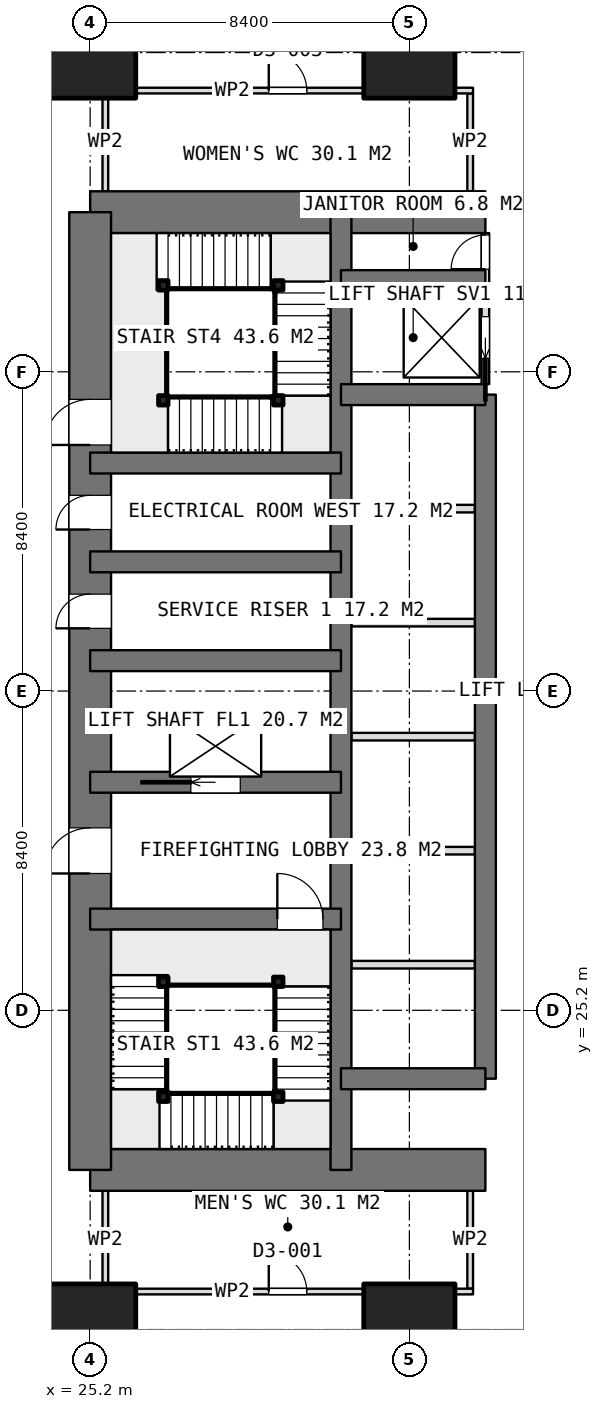
"""IFC4 building model, lengths in metres.
Left out: names, types, materials, properties, quantities, classifications, styles, units other than length and angle.
Written with IfcOpenShell. Run it as: python <this file> out.ifc"""

import sys

from ifc_helpers import new_model, si_unit, direction, frame, frame_2d, origin, origin_2d, place, context, subcontext, project, spatial, rectangle, extrude, element, fill, save


model = new_model("IFC4")
c1 = context("Model", 3, precision=1e-05, world=origin(), true_north=direction((0.0, 1.0)))
c2 = subcontext(c1, "Body", "Model", "MODEL_VIEW")
j1 = project(units=[si_unit("LENGTHUNIT", "METRE"), si_unit("PLANEANGLEUNIT", "RADIAN")], contexts=[c1])
p1 = place(None, origin())
s1 = spatial("IfcSite", under=j1, at=p1, CompositionType="ELEMENT")
p2 = place(p1, origin())
s2 = spatial("IfcBuilding", under=s1, at=p2, CompositionType="ELEMENT")
p3 = place(p2, frame((0.0, 0.0, -9.9)))
s3 = spatial("IfcBuildingStorey", under=s2, at=p3, CompositionType="ELEMENT", Elevation=-9.9)
for number, where, z_axis, x_axis in (
    (1, (25.2, 21.0, 0.0), (0.0, 0.0, 1.0), (1.0, 0.0, 0.0)),
    (2, (25.2, 46.2, 0.0), (0.0, 0.0, 1.0), (1.0, 0.0, 0.0)),
):
    element("IfcWall", number, at=place(p3, frame(where, z_axis=z_axis, x_axis=x_axis)), inside=s3, PredefinedType="SHEAR", context=c2, shape_type="SweptSolid", body=[
        extrude(rectangle(XDim=10.4, YDim=1.1, at=frame_2d((5.2, 0.0))), origin(), (0.0, 0.0, 1.0), 4.5),
    ])
p4 = place(p3, frame((25.2, 21.0, 0.0), z_axis=(0.0, 0.0, 1.0), x_axis=(0.0, 1.0, 0.0)))
e3 = element("IfcWall", 3, at=p4, inside=s3, PredefinedType="SHEAR", context=c2, shape_type="SweptSolid", body=[
    extrude(rectangle(XDim=25.2, YDim=1.1, at=frame_2d((12.6, 0.0))), origin(), (0.0, 0.0, 1.0), 4.5),
])
p5 = place(p4, frame((7.8, 0.0, 0.0)))
e4 = element("IfcOpeningElement", 4, at=p5, cuts=e3, PredefinedType="OPENING", context=c2, shape_type="SweptSolid", body=[
    extrude(rectangle(XDim=1.2, YDim=2.1, at=frame_2d((0.6, 1.05))), frame((0.0, 0.56, 0.0), z_axis=(0.0, -1.0, 0.0), x_axis=(1.0, 0.0, 0.0)), (0.0, 0.0, 1.0), 1.12),
])
p6 = place(p4, frame((14.25, 0.0, 0.0)))
e5 = element("IfcOpeningElement", 5, at=p6, cuts=e3, PredefinedType="OPENING", context=c2, shape_type="SweptSolid", body=[
    extrude(rectangle(XDim=0.9, YDim=2.1, at=frame_2d((0.45, 1.05))), frame((0.0, 0.56, 0.0), z_axis=(0.0, -1.0, 0.0), x_axis=(1.0, 0.0, 0.0)), (0.0, 0.0, 1.0), 1.12),
])
p7 = place(p4, frame((16.85, 0.0, 0.0)))
e6 = element("IfcOpeningElement", 6, at=p7, cuts=e3, PredefinedType="OPENING", context=c2, shape_type="SweptSolid", body=[
    extrude(rectangle(XDim=0.9, YDim=2.1, at=frame_2d((0.45, 1.05))), frame((0.0, 0.56, 0.0), z_axis=(0.0, -1.0, 0.0), x_axis=(1.0, 0.0, 0.0)), (0.0, 0.0, 1.0), 1.12),
])
p8 = place(p4, frame((19.075, 0.0, 0.0)))
e7 = element("IfcOpeningElement", 7, at=p8, cuts=e3, PredefinedType="OPENING", context=c2, shape_type="SweptSolid", body=[
    extrude(rectangle(XDim=1.2, YDim=2.1, at=frame_2d((0.6, 1.05))), frame((0.0, 0.56, 0.0), z_axis=(0.0, -1.0, 0.0), x_axis=(1.0, 0.0, 0.0)), (0.0, 0.0, 1.0), 1.12),
])
p9 = place(p3, frame((31.8, 21.0, 0.0), z_axis=(0.0, 0.0, 1.0), x_axis=(0.0, 1.0, 0.0)))
e8 = element("IfcWall", 8, at=p9, inside=s3, PredefinedType="SHEAR", context=c2, shape_type="SweptSolid", body=[
    extrude(rectangle(XDim=25.2, YDim=0.55, at=frame_2d((12.6, 0.0))), origin(), (0.0, 0.0, 1.0), 4.5),
])
p10 = place(p3, frame((35.6, 23.4, 0.0), z_axis=(0.0, 0.0, 1.0), x_axis=(0.0, 1.0, 0.0)))
e9 = element("IfcWall", 9, at=p10, inside=s3, PredefinedType="SHEAR", context=c2, shape_type="SweptSolid", body=[
    extrude(rectangle(XDim=18.0, YDim=0.55, at=frame_2d((9.0, 0.0))), origin(), (0.0, 0.0, 1.0), 4.5),
])
for number, where, z_axis, x_axis in (
    (10, (31.8, 23.4, 0.0), (0.0, 0.0, 1.0), (1.0, 0.0, 0.0)),
    (11, (31.8, 41.4, 0.0), (0.0, 0.0, 1.0), (1.0, 0.0, 0.0)),
    (12, (31.8, 44.4, 0.0), (0.0, 0.0, 1.0), (1.0, 0.0, 0.0)),
):
    element("IfcWall", number, at=place(p3, frame(where, z_axis=z_axis, x_axis=x_axis)), inside=s3, PredefinedType="SHEAR", context=c2, shape_type="SweptSolid", body=[
        extrude(rectangle(XDim=3.8, YDim=0.55, at=frame_2d((1.9, 0.0))), origin(), (0.0, 0.0, 1.0), 4.5),
    ])
p11 = place(p3, frame((25.2, 27.6, 0.0), z_axis=(0.0, 0.0, 1.0), x_axis=(1.0, 0.0, 0.0)))
e13 = element("IfcWall", 13, at=p11, inside=s3, PredefinedType="SHEAR", context=c2, shape_type="SweptSolid", body=[
    extrude(rectangle(XDim=6.6, YDim=0.55, at=frame_2d((3.3, 0.0))), origin(), (0.0, 0.0, 1.0), 4.5),
])
p12 = place(p11, frame((4.925, 0.0, 0.0)))
e14 = element("IfcOpeningElement", 14, at=p12, cuts=e13, PredefinedType="OPENING", context=c2, shape_type="SweptSolid", body=[
    extrude(rectangle(XDim=1.2, YDim=2.1, at=frame_2d((0.6, 1.05))), frame((0.0, 0.285, 0.0), z_axis=(0.0, -1.0, 0.0), x_axis=(1.0, 0.0, 0.0)), (0.0, 0.0, 1.0), 0.57),
])
p13 = place(p3, frame((25.2, 31.2, 0.0), z_axis=(0.0, 0.0, 1.0), x_axis=(1.0, 0.0, 0.0)))
e15 = element("IfcWall", 15, at=p13, inside=s3, PredefinedType="SHEAR", context=c2, shape_type="SweptSolid", body=[
    extrude(rectangle(XDim=6.6, YDim=0.55, at=frame_2d((3.3, 0.0))), origin(), (0.0, 0.0, 1.0), 4.5),
])
p14 = place(p13, frame((2.65, 0.0, 0.0)))
e16 = element("IfcOpeningElement", 16, at=p14, cuts=e15, PredefinedType="OPENING", context=c2, shape_type="SweptSolid", body=[
    extrude(rectangle(XDim=1.3, YDim=2.1, at=frame_2d((0.65, 1.05))), frame((0.0, 0.285, 0.0), z_axis=(0.0, -1.0, 0.0), x_axis=(1.0, 0.0, 0.0)), (0.0, 0.0, 1.0), 0.57),
])
for number, where, z_axis, x_axis in (
    (17, (25.2, 34.4, 0.0), (0.0, 0.0, 1.0), (1.0, 0.0, 0.0)),
    (18, (25.2, 37.0, 0.0), (0.0, 0.0, 1.0), (1.0, 0.0, 0.0)),
    (19, (25.2, 39.6, 0.0), (0.0, 0.0, 1.0), (1.0, 0.0, 0.0)),
):
    element("IfcWall", number, at=place(p3, frame(where, z_axis=z_axis, x_axis=x_axis)), inside=s3, PredefinedType="SHEAR", context=c2, shape_type="SweptSolid", body=[
        extrude(rectangle(XDim=6.6, YDim=0.55, at=frame_2d((3.3, 0.0))), origin(), (0.0, 0.0, 1.0), 4.5),
    ])
for number, where, z_axis, x_axis in (
    (20, (25.2, 16.8, 0.0), (0.0, 0.0, 1.0), (1.0, 0.0, 0.0)),
    (21, (25.2, 50.4, 0.0), (0.0, 0.0, 1.0), (1.0, 0.0, 0.0)),
    (22, (33.6, 16.8, 0.0), (0.0, 0.0, 1.0), (1.0, 0.0, 0.0)),
    (23, (33.6, 50.4, 0.0), (0.0, 0.0, 1.0), (1.0, 0.0, 0.0)),
):
    element("IfcColumn", number, at=place(p3, frame(where, z_axis=z_axis, x_axis=x_axis)), inside=s3, PredefinedType="COLUMN", context=c2, shape_type="SweptSolid", body=[
        extrude(rectangle(XDim=2.4, YDim=2.4, at=origin_2d()), origin(), (0.0, 0.0, 1.0), 4.5),
    ])
for number, where, z_axis, x_axis in (
    (24, (32.075, 26.4, 0.0), (0.0, 0.0, 1.0), (1.0, 0.0, 0.0)),
    (25, (32.075, 29.4, 0.0), (0.0, 0.0, 1.0), (1.0, 0.0, 0.0)),
    (26, (32.075, 32.4, 0.0), (0.0, 0.0, 1.0), (1.0, 0.0, 0.0)),
    (27, (32.075, 35.4, 0.0), (0.0, 0.0, 1.0), (1.0, 0.0, 0.0)),
    (28, (32.075, 38.4, 0.0), (0.0, 0.0, 1.0), (1.0, 0.0, 0.0)),
):
    element("IfcWall", number, at=place(p3, frame(where, z_axis=z_axis, x_axis=x_axis)), inside=s3, PredefinedType="PARTITIONING", context=c2, shape_type="SweptSolid", body=[
        extrude(rectangle(XDim=3.25, YDim=0.2, at=frame_2d((1.625, 0.0))), origin(), (0.0, 0.0, 1.0), 4.2),
    ])
p15 = place(p3, frame((35.6, 41.675, 0.0), z_axis=(0.0, 0.0, 1.0), x_axis=(0.0, 1.0, 0.0)))
e29 = element("IfcWall", 29, at=p15, inside=s3, PredefinedType="PARTITIONING", context=c2, shape_type="SweptSolid", body=[
    extrude(rectangle(XDim=3.975, YDim=0.2, at=frame_2d((1.987, 0.0))), origin(), (0.0, 0.0, 1.0), 4.2),
])
p16 = place(p15, frame((3.025, 0.0, 0.0)))
e30 = element("IfcOpeningElement", 30, at=p16, cuts=e29, PredefinedType="OPENING", context=c2, shape_type="SweptSolid", body=[
    extrude(rectangle(XDim=0.9, YDim=2.1, at=frame_2d((0.45, 1.05))), frame((0.0, 0.11, 0.0), z_axis=(0.0, -1.0, 0.0), x_axis=(1.0, 0.0, 0.0)), (0.0, 0.0, 1.0), 0.22),
])
p17 = place(p15, frame((0.675, 0.0, 0.0)))
e31 = element("IfcOpeningElement", 31, at=p17, cuts=e29, PredefinedType="OPENING", context=c2, shape_type="SweptSolid", body=[
    extrude(rectangle(XDim=1.1, YDim=2.1, at=frame_2d((0.55, 1.05))), frame((0.0, 0.11, 0.0), z_axis=(0.0, -1.0, 0.0), x_axis=(1.0, 0.0, 0.0)), (0.0, 0.0, 1.0), 0.22),
])
p18 = place(p3, frame((25.525, 49.4, 0.0), z_axis=(0.0, 0.0, 1.0), x_axis=(1.0, 0.0, 0.0)))
e32 = element("IfcWall", 32, at=p18, inside=s3, PredefinedType="PARTITIONING", context=c2, shape_type="SweptSolid", body=[
    extrude(rectangle(XDim=9.75, YDim=0.15, at=frame_2d((4.875, 0.0))), origin(), (0.0, 0.0, 1.0), 4.2),
])
p19 = place(p18, frame((4.375, 0.0, 0.0)))
e33 = element("IfcOpeningElement", 33, at=p19, cuts=e32, PredefinedType="OPENING", context=c2, shape_type="SweptSolid", body=[
    extrude(rectangle(XDim=1.0, YDim=2.1, at=frame_2d((0.5, 1.05))), frame((0.0, 0.085, 0.0), z_axis=(0.0, -1.0, 0.0), x_axis=(1.0, 0.0, 0.0)), (0.0, 0.0, 1.0), 0.17),
])
for number, where, z_axis, x_axis in (
    (34, (25.6, 46.75, 0.0), (0.0, 0.0, 1.0), (0.0, 1.0, 0.0)),
    (35, (35.2, 46.75, 0.0), (0.0, 0.0, 1.0), (0.0, 1.0, 0.0)),
):
    element("IfcWall", number, at=place(p3, frame(where, z_axis=z_axis, x_axis=x_axis)), inside=s3, PredefinedType="PARTITIONING", context=c2, shape_type="SweptSolid", body=[
        extrude(rectangle(XDim=2.575, YDim=0.15, at=frame_2d((1.288, 0.0))), origin(), (0.0, 0.0, 1.0), 4.2),
    ])
p20 = place(p3, frame((25.525, 17.8, 0.0), z_axis=(0.0, 0.0, 1.0), x_axis=(1.0, 0.0, 0.0)))
e36 = element("IfcWall", 36, at=p20, inside=s3, PredefinedType="PARTITIONING", context=c2, shape_type="SweptSolid", body=[
    extrude(rectangle(XDim=9.75, YDim=0.15, at=frame_2d((4.875, 0.0))), origin(), (0.0, 0.0, 1.0), 4.2),
])
p21 = place(p20, frame((4.375, 0.0, 0.0)))
e37 = element("IfcOpeningElement", 37, at=p21, cuts=e36, PredefinedType="OPENING", context=c2, shape_type="SweptSolid", body=[
    extrude(rectangle(XDim=1.0, YDim=2.1, at=frame_2d((0.5, 1.05))), frame((0.0, 0.085, 0.0), z_axis=(0.0, -1.0, 0.0), x_axis=(1.0, 0.0, 0.0)), (0.0, 0.0, 1.0), 0.17),
])
for number, where, z_axis, x_axis in (
    (38, (25.6, 17.875, 0.0), (0.0, 0.0, 1.0), (0.0, 1.0, 0.0)),
    (39, (35.2, 17.875, 0.0), (0.0, 0.0, 1.0), (0.0, 1.0, 0.0)),
):
    element("IfcWall", number, at=place(p3, frame(where, z_axis=z_axis, x_axis=x_axis)), inside=s3, PredefinedType="PARTITIONING", context=c2, shape_type="SweptSolid", body=[
        extrude(rectangle(XDim=2.575, YDim=0.15, at=frame_2d((1.288, 0.0))), origin(), (0.0, 0.0, 1.0), 4.2),
    ])
for number, where, z_axis, x_axis in (
    (40, (30.15, 25.95, 0.0), (0.0, 0.0, 1.0), (1.0, 0.0, 0.0)),
    (41, (30.15, 22.925, 0.0), (0.0, 0.0, 1.0), (1.0, 0.0, 0.0)),
    (42, (27.125, 22.925, 0.0), (0.0, 0.0, 1.0), (1.0, 0.0, 0.0)),
    (43, (27.125, 25.95, 0.0), (0.0, 0.0, 1.0), (1.0, 0.0, 0.0)),
    (44, (27.125, 41.25, 0.0), (0.0, 0.0, 1.0), (1.0, 0.0, 0.0)),
    (45, (30.15, 41.25, 0.0), (0.0, 0.0, 1.0), (1.0, 0.0, 0.0)),
    (46, (30.15, 44.275, 0.0), (0.0, 0.0, 1.0), (1.0, 0.0, 0.0)),
    (47, (27.125, 44.275, 0.0), (0.0, 0.0, 1.0), (1.0, 0.0, 0.0)),
):
    element("IfcColumn", number, at=place(p3, frame(where, z_axis=z_axis, x_axis=x_axis)), inside=s3, PredefinedType="COLUMN", context=c2, shape_type="SweptSolid", body=[
        extrude(rectangle(XDim=0.25, YDim=0.25, at=origin_2d()), origin(), (0.0, 0.0, 1.0), 4.5),
    ])
p22 = place(p5, origin())
e48 = element("IfcDoor", 48, at=p22, inside=s3, OperationType="SINGLE_SWING_LEFT", PredefinedType="DOOR", context=c2, shape_type="SweptSolid", body=[
    extrude(rectangle(XDim=1.2, YDim=2.1, at=frame_2d((0.6, 1.05))), frame((0.0, 0.025, 0.0), z_axis=(0.0, -1.0, 0.0), x_axis=(1.0, 0.0, 0.0)), (0.0, 0.0, 1.0), 0.05),
])
fill(e4, e48)
p23 = place(p6, origin())
e49 = element("IfcDoor", 49, at=p23, inside=s3, OperationType="SINGLE_SWING_LEFT", PredefinedType="DOOR", context=c2, shape_type="SweptSolid", body=[
    extrude(rectangle(XDim=0.9, YDim=2.1, at=frame_2d((0.45, 1.05))), frame((0.0, 0.025, 0.0), z_axis=(0.0, -1.0, 0.0), x_axis=(1.0, 0.0, 0.0)), (0.0, 0.0, 1.0), 0.05),
])
fill(e5, e49)
p24 = place(p7, origin())
e50 = element("IfcDoor", 50, at=p24, inside=s3, OperationType="SINGLE_SWING_LEFT", PredefinedType="DOOR", context=c2, shape_type="SweptSolid", body=[
    extrude(rectangle(XDim=0.9, YDim=2.1, at=frame_2d((0.45, 1.05))), frame((0.0, 0.025, 0.0), z_axis=(0.0, -1.0, 0.0), x_axis=(1.0, 0.0, 0.0)), (0.0, 0.0, 1.0), 0.05),
])
fill(e6, e50)
p25 = place(p16, origin())
e51 = element("IfcDoor", 51, at=p25, inside=s3, OperationType="SINGLE_SWING_LEFT", PredefinedType="DOOR", context=c2, shape_type="SweptSolid", body=[
    extrude(rectangle(XDim=0.9, YDim=2.1, at=frame_2d((0.45, 1.05))), frame((0.0, 0.025, 0.0), z_axis=(0.0, -1.0, 0.0), x_axis=(1.0, 0.0, 0.0)), (0.0, 0.0, 1.0), 0.05),
])
fill(e30, e51)
p26 = place(p14, origin())
e52 = element("IfcDoor", 52, at=p26, inside=s3, OperationType="SLIDING_TO_LEFT", PredefinedType="USERDEFINED", context=c2, shape_type="SweptSolid", body=[
    extrude(rectangle(XDim=1.3, YDim=2.1, at=frame_2d((0.65, 1.05))), frame((0.0, 0.025, 0.0), z_axis=(0.0, -1.0, 0.0), x_axis=(1.0, 0.0, 0.0)), (0.0, 0.0, 1.0), 0.05),
])
fill(e16, e52)
p27 = place(p17, origin())
e53 = element("IfcDoor", 53, at=p27, inside=s3, OperationType="SLIDING_TO_LEFT", PredefinedType="USERDEFINED", context=c2, shape_type="SweptSolid", body=[
    extrude(rectangle(XDim=1.1, YDim=2.1, at=frame_2d((0.55, 1.05))), frame((0.0, 0.025, 0.0), z_axis=(0.0, -1.0, 0.0), x_axis=(1.0, 0.0, 0.0)), (0.0, 0.0, 1.0), 0.05),
])
fill(e31, e53)
p28 = place(p19, origin())
e54 = element("IfcDoor", 54, at=p28, inside=s3, OperationType="SINGLE_SWING_LEFT", PredefinedType="DOOR", context=c2, shape_type="SweptSolid", body=[
    extrude(rectangle(XDim=1.0, YDim=2.1, at=frame_2d((0.5, 1.05))), frame((0.0, 0.025, 0.0), z_axis=(0.0, -1.0, 0.0), x_axis=(1.0, 0.0, 0.0)), (0.0, 0.0, 1.0), 0.05),
])
fill(e33, e54)
p29 = place(p21, origin())
e55 = element("IfcDoor", 55, at=p29, inside=s3, OperationType="SINGLE_SWING_LEFT", PredefinedType="DOOR", context=c2, shape_type="SweptSolid", body=[
    extrude(rectangle(XDim=1.0, YDim=2.1, at=frame_2d((0.5, 1.05))), frame((0.0, 0.025, 0.0), z_axis=(0.0, -1.0, 0.0), x_axis=(1.0, 0.0, 0.0)), (0.0, 0.0, 1.0), 0.05),
])
fill(e37, e55)
p30 = place(p12, origin())
e56 = element("IfcDoor", 56, at=p30, inside=s3, OperationType="SINGLE_SWING_RIGHT", PredefinedType="DOOR", context=c2, shape_type="SweptSolid", body=[
    extrude(rectangle(XDim=1.2, YDim=2.1, at=frame_2d((0.6, 1.05))), frame((0.0, 0.025, 0.0), z_axis=(0.0, -1.0, 0.0), x_axis=(1.0, 0.0, 0.0)), (0.0, 0.0, 1.0), 0.05),
])
fill(e14, e56)
p31 = place(p8, origin())
e57 = element("IfcDoor", 57, at=p31, inside=s3, OperationType="SINGLE_SWING_RIGHT", PredefinedType="DOOR", context=c2, shape_type="SweptSolid", body=[
    extrude(rectangle(XDim=1.2, YDim=2.1, at=frame_2d((0.6, 1.05))), frame((0.0, 0.025, 0.0), z_axis=(0.0, -1.0, 0.0), x_axis=(1.0, 0.0, 0.0)), (0.0, 0.0, 1.0), 0.05),
])
fill(e7, e57)
save(model, sys.argv[1])
